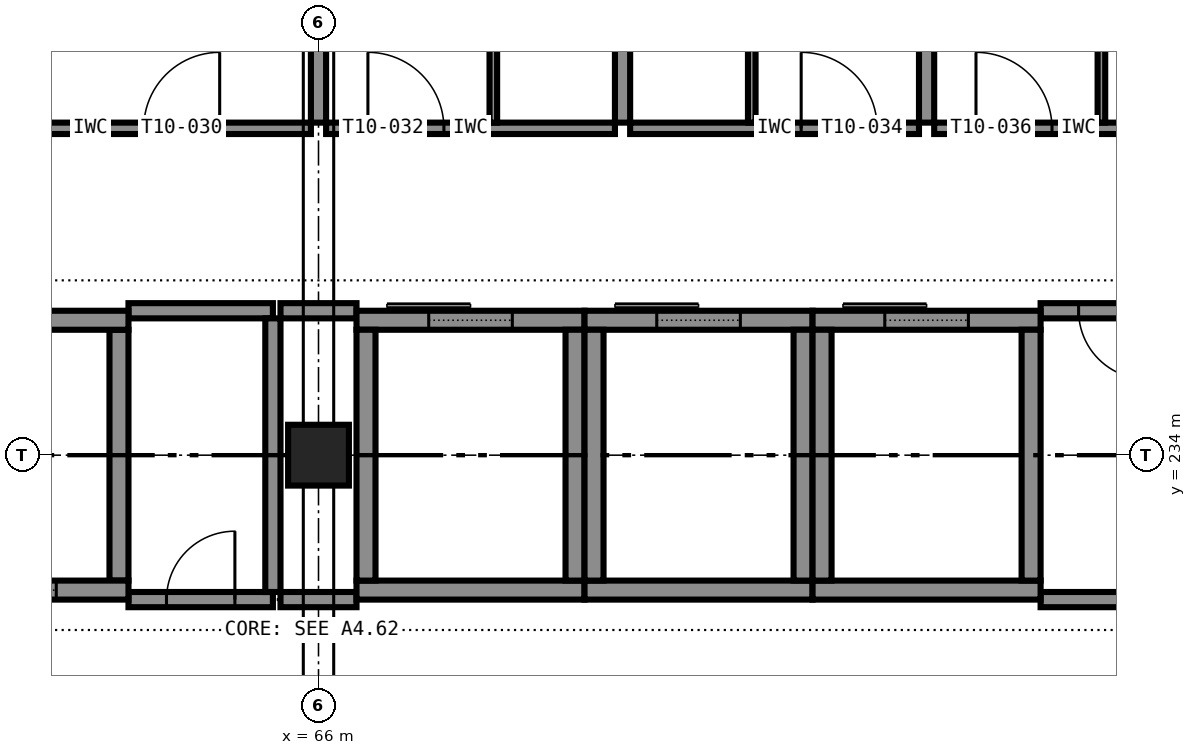
"""IFC4 building model, lengths in metres.
Left out: names, types, materials, properties, quantities, classifications, styles, units other than length and angle.
Written with IfcOpenShell. Run it as: python <this file> out.ifc"""

import sys

from ifc_helpers import new_model, si_unit, direction, frame, frame_2d, origin, origin_2d, place, context, subcontext, project, spatial, rectangle, extrude, element, fill, save


model = new_model("IFC4")
c1 = context("Model", 3, precision=1e-05, world=origin(), true_north=direction((0.0, 1.0)))
c2 = subcontext(c1, "Body", "Model", "MODEL_VIEW")
j1 = project(units=[si_unit("LENGTHUNIT", "METRE"), si_unit("PLANEANGLEUNIT", "RADIAN")], contexts=[c1])
p1 = place(None, origin())
s1 = spatial("IfcSite", under=j1, at=p1, CompositionType="ELEMENT")
p2 = place(p1, origin())
s2 = spatial("IfcBuilding", under=s1, at=p2, CompositionType="ELEMENT")
p3 = place(p2, frame((0.0, 0.0, 42.6)))
s3 = spatial("IfcBuildingStorey", under=s2, at=p3, CompositionType="ELEMENT", Elevation=42.6)
p4 = place(p3, frame((66.0, 234.0, 0.0), z_axis=(0.0, 0.0, 1.0), x_axis=(1.0, 0.0, 0.0)))
e1 = element("IfcColumn", 1, at=p4, inside=s3, PredefinedType="COLUMN", context=c2, shape_type="SweptSolid", body=[
    extrude(rectangle(XDim=0.8, YDim=0.8, at=origin_2d()), origin(), (0.0, 0.0, 1.0), 3.6),
])
p5 = place(p3, frame((60.5, 232.225, 0.0), z_axis=(0.0, 0.0, 1.0), x_axis=(1.0, 0.0, 0.0)))
e2 = element("IfcWall", 2, at=p5, inside=s3, PredefinedType="SHEAR", context=c2, shape_type="SweptSolid", body=[
    extrude(rectangle(XDim=3.0, YDim=0.25, at=frame_2d((1.5, 0.0))), origin(), (0.0, 0.0, 1.0), 3.6),
])
p6 = place(p5, frame((0.95, 0.0, 0.0)))
e3 = element("IfcOpeningElement", 3, at=p6, cuts=e2, PredefinedType="OPENING", context=c2, shape_type="SweptSolid", body=[
    extrude(rectangle(XDim=1.1, YDim=2.1, at=frame_2d((0.55, 1.05))), frame((0.0, 0.135, 0.0), z_axis=(0.0, -1.0, 0.0), x_axis=(1.0, 0.0, 0.0)), (0.0, 0.0, 1.0), 0.27),
])
p7 = place(p3, frame((60.5, 235.775, 0.0), z_axis=(0.0, 0.0, 1.0), x_axis=(1.0, 0.0, 0.0)))
e4 = element("IfcWall", 4, at=p7, inside=s3, PredefinedType="SHEAR", context=c2, shape_type="SweptSolid", body=[
    extrude(rectangle(XDim=3.0, YDim=0.25, at=frame_2d((1.5, 0.0))), origin(), (0.0, 0.0, 1.0), 3.6),
])
p8 = place(p3, frame((63.375, 232.35, 0.0), z_axis=(0.0, 0.0, 1.0), x_axis=(0.0, 1.0, 0.0)))
e5 = element("IfcWall", 5, at=p8, inside=s3, PredefinedType="SHEAR", context=c2, shape_type="SweptSolid", body=[
    extrude(rectangle(XDim=3.3, YDim=0.25, at=frame_2d((1.65, 0.0))), origin(), (0.0, 0.0, 1.0), 3.6),
])
p9 = place(p3, frame((66.5, 232.225, 0.0), z_axis=(0.0, 0.0, 1.0), x_axis=(1.0, 0.0, 0.0)))
e6 = element("IfcWall", 6, at=p9, inside=s3, PredefinedType="SHEAR", context=c2, shape_type="SweptSolid", body=[
    extrude(rectangle(XDim=3.0, YDim=0.25, at=frame_2d((1.5, 0.0))), origin(), (0.0, 0.0, 1.0), 3.6),
])
p10 = place(p3, frame((66.5, 235.775, 0.0), z_axis=(0.0, 0.0, 1.0), x_axis=(1.0, 0.0, 0.0)))
e7 = element("IfcWall", 7, at=p10, inside=s3, PredefinedType="SHEAR", context=c2, shape_type="SweptSolid", body=[
    extrude(rectangle(XDim=3.0, YDim=0.25, at=frame_2d((1.5, 0.0))), origin(), (0.0, 0.0, 1.0), 3.6),
])
p11 = place(p10, frame((0.95, 0.0, 0.0)))
e8 = element("IfcOpeningElement", 8, at=p11, cuts=e7, PredefinedType="OPENING", context=c2, shape_type="SweptSolid", body=[
    extrude(rectangle(XDim=1.1, YDim=2.1, at=frame_2d((0.55, 1.05))), frame((0.0, 0.135, 0.0), z_axis=(0.0, -1.0, 0.0), x_axis=(1.0, 0.0, 0.0)), (0.0, 0.0, 1.0), 0.27),
])
for number, where, z_axis, x_axis in (
    (9, (66.625, 232.35, 0.0), (0.0, 0.0, 1.0), (0.0, 1.0, 0.0)),
    (10, (69.375, 232.35, 0.0), (0.0, 0.0, 1.0), (0.0, 1.0, 0.0)),
):
    element("IfcWall", number, at=place(p3, frame(where, z_axis=z_axis, x_axis=x_axis)), inside=s3, PredefinedType="SHEAR", context=c2, shape_type="SweptSolid", body=[
        extrude(rectangle(XDim=3.3, YDim=0.25, at=frame_2d((1.65, 0.0))), origin(), (0.0, 0.0, 1.0), 3.6),
    ])
p12 = place(p3, frame((69.5, 232.225, 0.0), z_axis=(0.0, 0.0, 1.0), x_axis=(1.0, 0.0, 0.0)))
e11 = element("IfcWall", 11, at=p12, inside=s3, PredefinedType="SHEAR", context=c2, shape_type="SweptSolid", body=[
    extrude(rectangle(XDim=3.0, YDim=0.25, at=frame_2d((1.5, 0.0))), origin(), (0.0, 0.0, 1.0), 3.6),
])
p13 = place(p3, frame((69.5, 235.775, 0.0), z_axis=(0.0, 0.0, 1.0), x_axis=(1.0, 0.0, 0.0)))
e12 = element("IfcWall", 12, at=p13, inside=s3, PredefinedType="SHEAR", context=c2, shape_type="SweptSolid", body=[
    extrude(rectangle(XDim=3.0, YDim=0.25, at=frame_2d((1.5, 0.0))), origin(), (0.0, 0.0, 1.0), 3.6),
])
p14 = place(p13, frame((0.95, 0.0, 0.0)))
e13 = element("IfcOpeningElement", 13, at=p14, cuts=e12, PredefinedType="OPENING", context=c2, shape_type="SweptSolid", body=[
    extrude(rectangle(XDim=1.1, YDim=2.1, at=frame_2d((0.55, 1.05))), frame((0.0, 0.135, 0.0), z_axis=(0.0, -1.0, 0.0), x_axis=(1.0, 0.0, 0.0)), (0.0, 0.0, 1.0), 0.27),
])
for number, where, z_axis, x_axis in (
    (14, (69.625, 232.35, 0.0), (0.0, 0.0, 1.0), (0.0, 1.0, 0.0)),
    (15, (72.375, 232.35, 0.0), (0.0, 0.0, 1.0), (0.0, 1.0, 0.0)),
):
    element("IfcWall", number, at=place(p3, frame(where, z_axis=z_axis, x_axis=x_axis)), inside=s3, PredefinedType="SHEAR", context=c2, shape_type="SweptSolid", body=[
        extrude(rectangle(XDim=3.3, YDim=0.25, at=frame_2d((1.65, 0.0))), origin(), (0.0, 0.0, 1.0), 3.6),
    ])
p15 = place(p3, frame((72.5, 232.225, 0.0), z_axis=(0.0, 0.0, 1.0), x_axis=(1.0, 0.0, 0.0)))
e16 = element("IfcWall", 16, at=p15, inside=s3, PredefinedType="SHEAR", context=c2, shape_type="SweptSolid", body=[
    extrude(rectangle(XDim=3.0, YDim=0.25, at=frame_2d((1.5, 0.0))), origin(), (0.0, 0.0, 1.0), 3.6),
])
p16 = place(p3, frame((72.5, 235.775, 0.0), z_axis=(0.0, 0.0, 1.0), x_axis=(1.0, 0.0, 0.0)))
e17 = element("IfcWall", 17, at=p16, inside=s3, PredefinedType="SHEAR", context=c2, shape_type="SweptSolid", body=[
    extrude(rectangle(XDim=3.0, YDim=0.25, at=frame_2d((1.5, 0.0))), origin(), (0.0, 0.0, 1.0), 3.6),
])
p17 = place(p16, frame((0.95, 0.0, 0.0)))
e18 = element("IfcOpeningElement", 18, at=p17, cuts=e17, PredefinedType="OPENING", context=c2, shape_type="SweptSolid", body=[
    extrude(rectangle(XDim=1.1, YDim=2.1, at=frame_2d((0.55, 1.05))), frame((0.0, 0.135, 0.0), z_axis=(0.0, -1.0, 0.0), x_axis=(1.0, 0.0, 0.0)), (0.0, 0.0, 1.0), 0.27),
])
for number, where, z_axis, x_axis in (
    (19, (72.625, 232.35, 0.0), (0.0, 0.0, 1.0), (0.0, 1.0, 0.0)),
    (20, (75.375, 232.35, 0.0), (0.0, 0.0, 1.0), (0.0, 1.0, 0.0)),
):
    element("IfcWall", number, at=place(p3, frame(where, z_axis=z_axis, x_axis=x_axis)), inside=s3, PredefinedType="SHEAR", context=c2, shape_type="SweptSolid", body=[
        extrude(rectangle(XDim=3.3, YDim=0.25, at=frame_2d((1.65, 0.0))), origin(), (0.0, 0.0, 1.0), 3.6),
    ])
p18 = place(p3, frame((63.5, 232.1, 0.0), z_axis=(0.0, 0.0, 1.0), x_axis=(1.0, 0.0, 0.0)))
e21 = element("IfcWall", 21, at=p18, inside=s3, PredefinedType="PARTITIONING", context=c2, shape_type="SweptSolid", body=[
    extrude(rectangle(XDim=1.9, YDim=0.2, at=frame_2d((0.95, 0.0))), origin(), (0.0, 0.0, 1.0), 3.4),
])
p19 = place(p18, frame((0.5, 0.0, 0.0)))
e22 = element("IfcOpeningElement", 22, at=p19, cuts=e21, PredefinedType="OPENING", context=c2, shape_type="SweptSolid", body=[
    extrude(rectangle(XDim=0.9, YDim=2.1, at=frame_2d((0.45, 1.05))), frame((0.0, 0.11, 0.0), z_axis=(0.0, -1.0, 0.0), x_axis=(1.0, 0.0, 0.0)), (0.0, 0.0, 1.0), 0.22),
])
p20 = place(p3, frame((65.5, 232.1, 0.0), z_axis=(0.0, 0.0, 1.0), x_axis=(1.0, 0.0, 0.0)))
e23 = element("IfcWall", 23, at=p20, inside=s3, PredefinedType="PARTITIONING", context=c2, shape_type="SweptSolid", body=[
    extrude(rectangle(XDim=1.0, YDim=0.2, at=frame_2d((0.5, 0.0))), origin(), (0.0, 0.0, 1.0), 3.4),
])
for number, where, z_axis, x_axis in (
    (24, (75.5, 232.1, 0.0), (0.0, 0.0, 1.0), (1.0, 0.0, 0.0)),
    (25, (63.5, 235.9, 0.0), (0.0, 0.0, 1.0), (1.0, 0.0, 0.0)),
):
    element("IfcWall", number, at=place(p3, frame(where, z_axis=z_axis, x_axis=x_axis)), inside=s3, PredefinedType="PARTITIONING", context=c2, shape_type="SweptSolid", body=[
        extrude(rectangle(XDim=1.9, YDim=0.2, at=frame_2d((0.95, 0.0))), origin(), (0.0, 0.0, 1.0), 3.4),
    ])
p21 = place(p3, frame((65.5, 235.9, 0.0), z_axis=(0.0, 0.0, 1.0), x_axis=(1.0, 0.0, 0.0)))
e26 = element("IfcWall", 26, at=p21, inside=s3, PredefinedType="PARTITIONING", context=c2, shape_type="SweptSolid", body=[
    extrude(rectangle(XDim=1.0, YDim=0.2, at=frame_2d((0.5, 0.0))), origin(), (0.0, 0.0, 1.0), 3.4),
])
p22 = place(p3, frame((77.4, 235.9, 0.0), z_axis=(0.0, 0.0, 1.0), x_axis=(-1.0, 0.0, 0.0)))
e27 = element("IfcWall", 27, at=p22, inside=s3, PredefinedType="PARTITIONING", context=c2, shape_type="SweptSolid", body=[
    extrude(rectangle(XDim=1.9, YDim=0.2, at=frame_2d((0.95, 0.0))), origin(), (0.0, 0.0, 1.0), 3.4),
])
p23 = place(p22, frame((0.5, 0.0, 0.0)))
e28 = element("IfcOpeningElement", 28, at=p23, cuts=e27, PredefinedType="OPENING", context=c2, shape_type="SweptSolid", body=[
    extrude(rectangle(XDim=0.9, YDim=2.1, at=frame_2d((0.45, 1.05))), frame((0.0, 0.11, 0.0), z_axis=(0.0, -1.0, 0.0), x_axis=(1.0, 0.0, 0.0)), (0.0, 0.0, 1.0), 0.22),
])
p24 = place(p3, frame((65.4, 232.2, 0.0), z_axis=(0.0, 0.0, 1.0), x_axis=(0.0, 1.0, 0.0)))
e29 = element("IfcWall", 29, at=p24, inside=s3, PredefinedType="PARTITIONING", context=c2, shape_type="SweptSolid", body=[
    extrude(rectangle(XDim=3.6, YDim=0.2, at=frame_2d((1.8, 0.0))), origin(), (0.0, 0.0, 1.0), 3.4),
])
p25 = place(p3, frame((60.1, 238.3, 0.0), z_axis=(0.0, 0.0, 1.0), x_axis=(1.0, 0.0, 0.0)))
e30 = element("IfcWall", 30, at=p25, inside=s3, PredefinedType="PARTITIONING", context=c2, shape_type="SweptSolid", body=[
    extrude(rectangle(XDim=5.8, YDim=0.15, at=frame_2d((2.9, 0.0))), origin(), (0.0, 0.0, 1.0), 3.4),
])
p26 = place(p25, frame((3.6, 0.0, 0.0)))
e31 = element("IfcOpeningElement", 31, at=p26, cuts=e30, PredefinedType="OPENING", context=c2, shape_type="SweptSolid", body=[
    extrude(rectangle(XDim=1.0, YDim=2.1, at=frame_2d((0.5, 1.05))), frame((0.0, 0.085, 0.0), z_axis=(0.0, -1.0, 0.0), x_axis=(1.0, 0.0, 0.0)), (0.0, 0.0, 1.0), 0.17),
])
p27 = place(p3, frame((66.1, 238.3, 0.0), z_axis=(0.0, 0.0, 1.0), x_axis=(1.0, 0.0, 0.0)))
e32 = element("IfcWall", 32, at=p27, inside=s3, PredefinedType="PARTITIONING", context=c2, shape_type="SweptSolid", body=[
    extrude(rectangle(XDim=3.8, YDim=0.15, at=frame_2d((1.9, 0.0))), origin(), (0.0, 0.0, 1.0), 3.4),
])
p28 = place(p27, frame((0.55, 0.0, 0.0)))
e33 = element("IfcOpeningElement", 33, at=p28, cuts=e32, PredefinedType="OPENING", context=c2, shape_type="SweptSolid", body=[
    extrude(rectangle(XDim=1.0, YDim=2.1, at=frame_2d((0.5, 1.05))), frame((0.0, 0.085, 0.0), z_axis=(0.0, -1.0, 0.0), x_axis=(1.0, 0.0, 0.0)), (0.0, 0.0, 1.0), 0.17),
])
p29 = place(p3, frame((68.3, 238.375, 0.0), z_axis=(0.0, 0.0, 1.0), x_axis=(0.0, 1.0, 0.0)))
e34 = element("IfcWall", 34, at=p29, inside=s3, PredefinedType="PARTITIONING", context=c2, shape_type="SweptSolid", body=[
    extrude(rectangle(XDim=2.875, YDim=0.1, at=frame_2d((1.438, 0.0))), origin(), (0.0, 0.0, 1.0), 3.4),
])
p30 = place(p29, frame((1.038, 0.0, 0.0)))
e35 = element("IfcOpeningElement", 35, at=p30, cuts=e34, PredefinedType="OPENING", context=c2, shape_type="SweptSolid", body=[
    extrude(rectangle(XDim=0.8, YDim=2.1, at=frame_2d((0.4, 1.05))), frame((0.0, 0.06, 0.0), z_axis=(0.0, -1.0, 0.0), x_axis=(1.0, 0.0, 0.0)), (0.0, 0.0, 1.0), 0.12),
])
p31 = place(p3, frame((70.1, 238.3, 0.0), z_axis=(0.0, 0.0, 1.0), x_axis=(1.0, 0.0, 0.0)))
e36 = element("IfcWall", 36, at=p31, inside=s3, PredefinedType="PARTITIONING", context=c2, shape_type="SweptSolid", body=[
    extrude(rectangle(XDim=3.8, YDim=0.15, at=frame_2d((1.9, 0.0))), origin(), (0.0, 0.0, 1.0), 3.4),
])
p32 = place(p31, frame((2.25, 0.0, 0.0)))
e37 = element("IfcOpeningElement", 37, at=p32, cuts=e36, PredefinedType="OPENING", context=c2, shape_type="SweptSolid", body=[
    extrude(rectangle(XDim=1.0, YDim=2.1, at=frame_2d((0.5, 1.05))), frame((0.0, 0.085, 0.0), z_axis=(0.0, -1.0, 0.0), x_axis=(1.0, 0.0, 0.0)), (0.0, 0.0, 1.0), 0.17),
])
p33 = place(p3, frame((71.7, 241.25, 0.0), z_axis=(0.0, 0.0, 1.0), x_axis=(0.0, -1.0, 0.0)))
e38 = element("IfcWall", 38, at=p33, inside=s3, PredefinedType="PARTITIONING", context=c2, shape_type="SweptSolid", body=[
    extrude(rectangle(XDim=2.875, YDim=0.1, at=frame_2d((1.438, 0.0))), origin(), (0.0, 0.0, 1.0), 3.4),
])
p34 = place(p33, frame((1.038, 0.0, 0.0)))
e39 = element("IfcOpeningElement", 39, at=p34, cuts=e38, PredefinedType="OPENING", context=c2, shape_type="SweptSolid", body=[
    extrude(rectangle(XDim=0.8, YDim=2.1, at=frame_2d((0.4, 1.05))), frame((0.0, 0.06, 0.0), z_axis=(0.0, -1.0, 0.0), x_axis=(1.0, 0.0, 0.0)), (0.0, 0.0, 1.0), 0.12),
])
p35 = place(p3, frame((74.1, 238.3, 0.0), z_axis=(0.0, 0.0, 1.0), x_axis=(1.0, 0.0, 0.0)))
e40 = element("IfcWall", 40, at=p35, inside=s3, PredefinedType="PARTITIONING", context=c2, shape_type="SweptSolid", body=[
    extrude(rectangle(XDim=3.8, YDim=0.15, at=frame_2d((1.9, 0.0))), origin(), (0.0, 0.0, 1.0), 3.4),
])
p36 = place(p35, frame((0.55, 0.0, 0.0)))
e41 = element("IfcOpeningElement", 41, at=p36, cuts=e40, PredefinedType="OPENING", context=c2, shape_type="SweptSolid", body=[
    extrude(rectangle(XDim=1.0, YDim=2.1, at=frame_2d((0.5, 1.05))), frame((0.0, 0.085, 0.0), z_axis=(0.0, -1.0, 0.0), x_axis=(1.0, 0.0, 0.0)), (0.0, 0.0, 1.0), 0.17),
])
p37 = place(p3, frame((76.3, 238.375, 0.0), z_axis=(0.0, 0.0, 1.0), x_axis=(0.0, 1.0, 0.0)))
e42 = element("IfcWall", 42, at=p37, inside=s3, PredefinedType="PARTITIONING", context=c2, shape_type="SweptSolid", body=[
    extrude(rectangle(XDim=2.875, YDim=0.1, at=frame_2d((1.438, 0.0))), origin(), (0.0, 0.0, 1.0), 3.4),
])
p38 = place(p37, frame((1.038, 0.0, 0.0)))
e43 = element("IfcOpeningElement", 43, at=p38, cuts=e42, PredefinedType="OPENING", context=c2, shape_type="SweptSolid", body=[
    extrude(rectangle(XDim=0.8, YDim=2.1, at=frame_2d((0.4, 1.05))), frame((0.0, 0.06, 0.0), z_axis=(0.0, -1.0, 0.0), x_axis=(1.0, 0.0, 0.0)), (0.0, 0.0, 1.0), 0.12),
])
p39 = place(p3, frame((66.0, 245.6, 0.0), z_axis=(0.0, 0.0, 1.0), x_axis=(0.0, -1.0, 0.0)))
e44 = element("IfcWall", 44, at=p39, inside=s3, PredefinedType="PARTITIONING", context=c2, shape_type="SweptSolid", body=[
    extrude(rectangle(XDim=7.225, YDim=0.2, at=frame_2d((3.613, 0.0))), origin(), (0.0, 0.0, 1.0), 2.6),
])
for number, where, z_axis, x_axis in (
    (45, (70.0, 245.7, 0.0), (0.0, 0.0, 1.0), (0.0, -1.0, 0.0)),
    (46, (74.0, 245.7, 0.0), (0.0, 0.0, 1.0), (0.0, -1.0, 0.0)),
):
    element("IfcWall", number, at=place(p3, frame(where, z_axis=z_axis, x_axis=x_axis)), inside=s3, PredefinedType="PARTITIONING", context=c2, shape_type="SweptSolid", body=[
        extrude(rectangle(XDim=7.325, YDim=0.2, at=frame_2d((3.663, 0.0))), origin(), (0.0, 0.0, 1.0), 3.4),
    ])
p40 = place(p19, origin())
e47 = element("IfcDoor", 47, at=p40, inside=s3, OperationType="SINGLE_SWING_RIGHT", PredefinedType="DOOR", context=c2, shape_type="SweptSolid", body=[
    extrude(rectangle(XDim=0.9, YDim=2.1, at=frame_2d((0.45, 1.05))), frame((0.0, 0.025, 0.0), z_axis=(0.0, -1.0, 0.0), x_axis=(1.0, 0.0, 0.0)), (0.0, 0.0, 1.0), 0.05),
])
fill(e22, e47)
p41 = place(p23, origin())
e48 = element("IfcDoor", 48, at=p41, inside=s3, OperationType="SINGLE_SWING_LEFT", PredefinedType="DOOR", context=c2, shape_type="SweptSolid", body=[
    extrude(rectangle(XDim=0.9, YDim=2.1, at=frame_2d((0.45, 1.05))), frame((0.0, 0.025, 0.0), z_axis=(0.0, -1.0, 0.0), x_axis=(1.0, 0.0, 0.0)), (0.0, 0.0, 1.0), 0.05),
])
fill(e28, e48)
p42 = place(p26, origin())
e49 = element("IfcDoor", 49, at=p42, inside=s3, OperationType="SINGLE_SWING_RIGHT", PredefinedType="DOOR", context=c2, shape_type="SweptSolid", body=[
    extrude(rectangle(XDim=1.0, YDim=2.1, at=frame_2d((0.5, 1.05))), frame((0.0, 0.025, 0.0), z_axis=(0.0, -1.0, 0.0), x_axis=(1.0, 0.0, 0.0)), (0.0, 0.0, 1.0), 0.05),
])
fill(e31, e49)
p43 = place(p28, origin())
e50 = element("IfcDoor", 50, at=p43, inside=s3, OperationType="SINGLE_SWING_LEFT", PredefinedType="DOOR", context=c2, shape_type="SweptSolid", body=[
    extrude(rectangle(XDim=1.0, YDim=2.1, at=frame_2d((0.5, 1.05))), frame((0.0, 0.025, 0.0), z_axis=(0.0, -1.0, 0.0), x_axis=(1.0, 0.0, 0.0)), (0.0, 0.0, 1.0), 0.05),
])
fill(e33, e50)
p44 = place(p32, origin())
e51 = element("IfcDoor", 51, at=p44, inside=s3, OperationType="SINGLE_SWING_LEFT", PredefinedType="DOOR", context=c2, shape_type="SweptSolid", body=[
    extrude(rectangle(XDim=1.0, YDim=2.1, at=frame_2d((0.5, 1.05))), frame((0.0, 0.025, 0.0), z_axis=(0.0, -1.0, 0.0), x_axis=(1.0, 0.0, 0.0)), (0.0, 0.0, 1.0), 0.05),
])
fill(e37, e51)
p45 = place(p36, origin())
e52 = element("IfcDoor", 52, at=p45, inside=s3, OperationType="SINGLE_SWING_LEFT", PredefinedType="DOOR", context=c2, shape_type="SweptSolid", body=[
    extrude(rectangle(XDim=1.0, YDim=2.1, at=frame_2d((0.5, 1.05))), frame((0.0, 0.025, 0.0), z_axis=(0.0, -1.0, 0.0), x_axis=(1.0, 0.0, 0.0)), (0.0, 0.0, 1.0), 0.05),
])
fill(e41, e52)
p46 = place(p6, origin())
e53 = element("IfcDoor", 53, at=p46, inside=s3, OperationType="SLIDING_TO_LEFT", PredefinedType="DOOR", context=c2, shape_type="SweptSolid", body=[
    extrude(rectangle(XDim=1.1, YDim=2.1, at=frame_2d((0.55, 1.05))), frame((0.0, 0.025, 0.0), z_axis=(0.0, -1.0, 0.0), x_axis=(1.0, 0.0, 0.0)), (0.0, 0.0, 1.0), 0.05),
])
fill(e3, e53)
p47 = place(p11, origin())
e54 = element("IfcDoor", 54, at=p47, inside=s3, OperationType="SLIDING_TO_LEFT", PredefinedType="DOOR", context=c2, shape_type="SweptSolid", body=[
    extrude(rectangle(XDim=1.1, YDim=2.1, at=frame_2d((0.55, 1.05))), frame((0.0, 0.025, 0.0), z_axis=(0.0, -1.0, 0.0), x_axis=(1.0, 0.0, 0.0)), (0.0, 0.0, 1.0), 0.05),
])
fill(e8, e54)
p48 = place(p14, origin())
e55 = element("IfcDoor", 55, at=p48, inside=s3, OperationType="SLIDING_TO_LEFT", PredefinedType="DOOR", context=c2, shape_type="SweptSolid", body=[
    extrude(rectangle(XDim=1.1, YDim=2.1, at=frame_2d((0.55, 1.05))), frame((0.0, 0.025, 0.0), z_axis=(0.0, -1.0, 0.0), x_axis=(1.0, 0.0, 0.0)), (0.0, 0.0, 1.0), 0.05),
])
fill(e13, e55)
p49 = place(p17, origin())
e56 = element("IfcDoor", 56, at=p49, inside=s3, OperationType="SLIDING_TO_LEFT", PredefinedType="DOOR", context=c2, shape_type="SweptSolid", body=[
    extrude(rectangle(XDim=1.1, YDim=2.1, at=frame_2d((0.55, 1.05))), frame((0.0, 0.025, 0.0), z_axis=(0.0, -1.0, 0.0), x_axis=(1.0, 0.0, 0.0)), (0.0, 0.0, 1.0), 0.05),
])
fill(e18, e56)
save(model, sys.argv[1])
